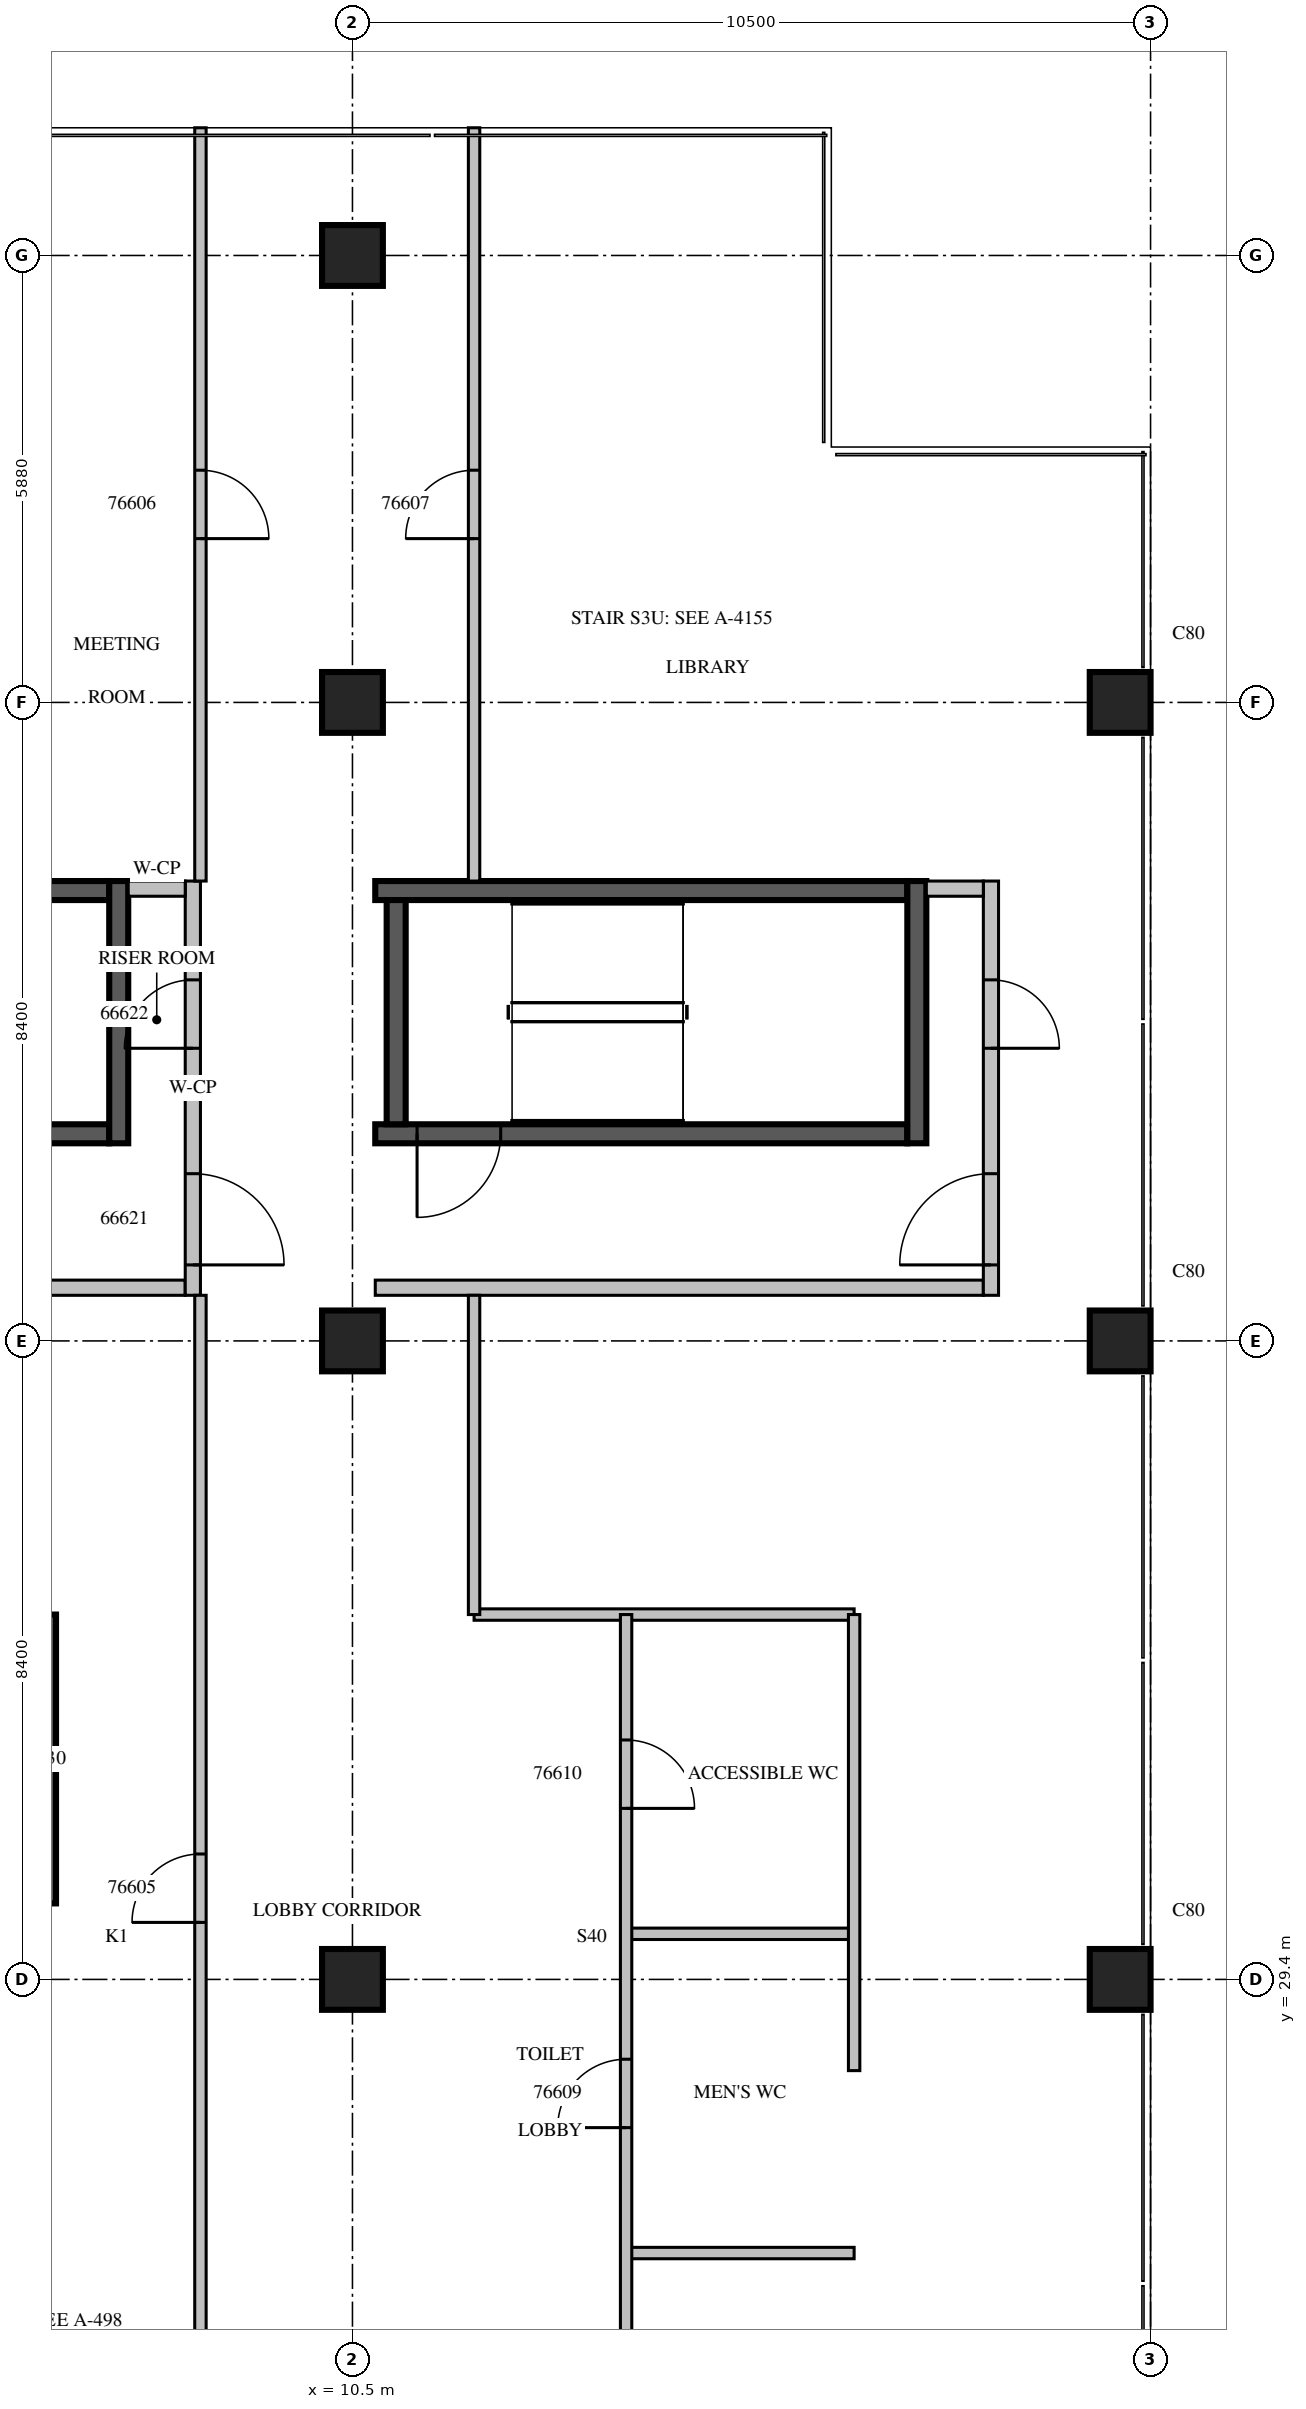
"""IFC4 building model, lengths in metres.
Left out: names, types, materials, properties, quantities, classifications, styles, units other than length and angle.
Written with IfcOpenShell. Run it as: python <this file> out.ifc"""

import sys

from ifc_helpers import new_model, si_unit, direction, frame, frame_2d, origin, origin_2d, place, context, subcontext, project, spatial, rectangle, extrude, source, transform, mapped, element, fill, save


model = new_model("IFC4")
c1 = context("Model", 3, precision=1e-05, world=origin(), true_north=direction((0.0, 1.0)))
c2 = subcontext(c1, "Body", "Model", "MODEL_VIEW")
j1 = project(units=[si_unit("LENGTHUNIT", "METRE"), si_unit("PLANEANGLEUNIT", "RADIAN")], contexts=[c1])
p1 = place(None, origin())
s1 = spatial("IfcSite", under=j1, at=p1, CompositionType="ELEMENT")
p2 = place(p1, origin())
s2 = spatial("IfcBuilding", under=s1, at=p2, CompositionType="ELEMENT")
p3 = place(p2, frame((0.0, 0.0, 277.0)))
s3 = spatial("IfcBuildingStorey", under=s2, at=p3, CompositionType="ELEMENT", Elevation=277.0)
m1 = source(origin(), c2, "Body", "SweptSolid", [
    extrude(rectangle(XDim=0.8, YDim=0.8, at=origin_2d()), origin(), (0.0, 0.0, 1.0), 7.5),
])
for number, where, z_axis, x_axis in (
    (1, (10.5, 29.4, 0.0), (0.0, 0.0, 1.0), (1.0, 0.0, 0.0)),
    (2, (20.6, 29.4, 0.0), (0.0, 0.0, 1.0), (1.0, 0.0, 0.0)),
    (3, (10.5, 37.8, 0.0), (0.0, 0.0, 1.0), (1.0, 0.0, 0.0)),
    (4, (20.6, 37.8, 0.0), (0.0, 0.0, 1.0), (1.0, 0.0, 0.0)),
    (5, (10.5, 46.2, 0.0), (0.0, 0.0, 1.0), (1.0, 0.0, 0.0)),
    (6, (20.6, 46.2, 0.0), (0.0, 0.0, 1.0), (1.0, 0.0, 0.0)),
    (7, (10.5, 52.08, 0.0), (0.0, 0.0, 1.0), (1.0, 0.0, 0.0)),
):
    element("IfcColumn", number, at=place(p3, frame(where, z_axis=z_axis, x_axis=x_axis)), inside=s3, PredefinedType="COLUMN", context=c2, shape_type="MappedRepresentation", body=[
        mapped(m1, transform((0.0, 0.0, 0.0), scale=1.0)),
    ])
m2 = source(origin(), c2, "Body", "SweptSolid", [
    extrude(rectangle(XDim=3.8, YDim=0.3, at=frame_2d((1.9, 0.0))), origin(), (0.0, 0.0, 1.0), 7.1),
])
p4 = place(p3, frame((6.45, 34.2, 0.0), z_axis=(0.0, 0.0, 1.0), x_axis=(0.0, -1.0, 0.0)))
e8 = element("IfcWall", 8, at=p4, inside=s3, PredefinedType="SOLIDWALL", context=c2, shape_type="MappedRepresentation", body=[
    mapped(m2, transform((0.0, 0.0, 0.0), scale=1.0)),
])
m3 = source(origin(), c2, "Body", "SweptSolid", [
    extrude(rectangle(XDim=7.0, YDim=0.25, at=frame_2d((3.5, 0.0))), origin(), (0.0, 0.0, 1.0), 7.1),
])
p5 = place(p3, frame((0.3, 40.525, 0.0), z_axis=(0.0, 0.0, 1.0), x_axis=(1.0, 0.0, 0.0)))
e9 = element("IfcWall", 9, at=p5, inside=s3, PredefinedType="SOLIDWALL", context=c2, shape_type="MappedRepresentation", body=[
    mapped(m3, transform((0.0, 0.0, 0.0), scale=1.0)),
])
m4 = source(origin(), c2, "Body", "SweptSolid", [
    extrude(rectangle(XDim=1.1, YDim=2.1, at=frame_2d((0.55, 1.05))), frame((0.0, 0.135, 0.0), z_axis=(0.0, -1.0, 0.0), x_axis=(1.0, 0.0, 0.0)), (0.0, 0.0, 1.0), 0.27),
])
p6 = place(p5, frame((0.55, 0.0, 0.0)))
e10 = element("IfcOpeningElement", 10, at=p6, cuts=e9, PredefinedType="OPENING", context=c2, shape_type="MappedRepresentation", body=[
    mapped(m4, transform((0.0, 0.0, 0.0), scale=1.0)),
])
m5 = source(origin(), c2, "Body", "SweptSolid", [
    extrude(rectangle(XDim=1.0, YDim=0.25, at=frame_2d((0.5, 0.0))), origin(), (0.0, 0.0, 1.0), 7.1),
])
p7 = place(p3, frame((6.3, 43.725, 0.0), z_axis=(0.0, 0.0, 1.0), x_axis=(1.0, 0.0, 0.0)))
e11 = element("IfcWall", 11, at=p7, inside=s3, PredefinedType="SOLIDWALL", context=c2, shape_type="MappedRepresentation", body=[
    mapped(m5, transform((0.0, 0.0, 0.0), scale=1.0)),
])
m6 = source(origin(), c2, "Body", "SweptSolid", [
    extrude(rectangle(XDim=3.45, YDim=0.25, at=frame_2d((1.725, 0.0))), origin(), (0.0, 0.0, 1.0), 7.1),
])
p8 = place(p3, frame((7.425, 40.4, 0.0), z_axis=(0.0, 0.0, 1.0), x_axis=(0.0, 1.0, 0.0)))
e12 = element("IfcWall", 12, at=p8, inside=s3, PredefinedType="SOLIDWALL", context=c2, shape_type="MappedRepresentation", body=[
    mapped(m6, transform((0.0, 0.0, 0.0), scale=1.0)),
])
m7 = source(origin(), c2, "Body", "SweptSolid", [
    extrude(rectangle(XDim=8.0, YDim=0.2, at=frame_2d((4.0, 0.0))), origin(), (0.0, 0.0, 1.0), 7.1),
])
p9 = place(p3, frame((0.3, 38.5, 0.0), z_axis=(0.0, 0.0, 1.0), x_axis=(1.0, 0.0, 0.0)))
e13 = element("IfcWall", 13, at=p9, inside=s3, PredefinedType="PARTITIONING", context=c2, shape_type="MappedRepresentation", body=[
    mapped(m7, transform((0.0, 0.0, 0.0), scale=1.0)),
])
m8 = source(origin(), c2, "Body", "SweptSolid", [
    extrude(rectangle(XDim=5.45, YDim=0.2, at=frame_2d((2.725, 0.0))), origin(), (0.0, 0.0, 1.0), 7.1),
])
p10 = place(p3, frame((8.4, 38.4, 0.0), z_axis=(0.0, 0.0, 1.0), x_axis=(0.0, 1.0, 0.0)))
e14 = element("IfcWall", 14, at=p10, inside=s3, PredefinedType="PARTITIONING", context=c2, shape_type="MappedRepresentation", body=[
    mapped(m8, transform((0.0, 0.0, 0.0), scale=1.0)),
])
m9 = source(origin(), c2, "Body", "SweptSolid", [
    extrude(rectangle(XDim=1.2, YDim=2.1, at=frame_2d((0.6, 1.05))), frame((0.0, 0.11, 0.0), z_axis=(0.0, -1.0, 0.0), x_axis=(1.0, 0.0, 0.0)), (0.0, 0.0, 1.0), 0.22),
])
p11 = place(p10, frame((0.4, 0.0, 0.0)))
e15 = element("IfcOpeningElement", 15, at=p11, cuts=e14, PredefinedType="OPENING", context=c2, shape_type="MappedRepresentation", body=[
    mapped(m9, transform((0.0, 0.0, 0.0), scale=1.0)),
])
m10 = source(origin(), c2, "Body", "SweptSolid", [
    extrude(rectangle(XDim=0.9, YDim=2.1, at=frame_2d((0.45, 1.05))), frame((0.0, 0.11, 0.0), z_axis=(0.0, -1.0, 0.0), x_axis=(1.0, 0.0, 0.0)), (0.0, 0.0, 1.0), 0.22),
])
p12 = place(p10, frame((3.25, 0.0, 0.0)))
e16 = element("IfcOpeningElement", 16, at=p12, cuts=e14, PredefinedType="OPENING", context=c2, shape_type="MappedRepresentation", body=[
    mapped(m10, transform((0.0, 0.0, 0.0), scale=1.0)),
])
m11 = source(origin(), c2, "Body", "SweptSolid", [
    extrude(rectangle(XDim=0.75, YDim=0.2, at=frame_2d((0.375, 0.0))), origin(), (0.0, 0.0, 1.0), 7.1),
])
p13 = place(p3, frame((7.55, 43.75, 0.0), z_axis=(0.0, 0.0, 1.0), x_axis=(1.0, 0.0, 0.0)))
e17 = element("IfcWall", 17, at=p13, inside=s3, PredefinedType="PARTITIONING", context=c2, shape_type="MappedRepresentation", body=[
    mapped(m11, transform((0.0, 0.0, 0.0), scale=1.0)),
])
p14 = place(p3, frame((10.8, 40.525, 0.0), z_axis=(0.0, 0.0, 1.0), x_axis=(1.0, 0.0, 0.0)))
e18 = element("IfcWall", 18, at=p14, inside=s3, PredefinedType="SOLIDWALL", context=c2, shape_type="MappedRepresentation", body=[
    mapped(m3, transform((0.0, 0.0, 0.0), scale=1.0)),
])
p15 = place(p14, frame((0.55, 0.0, 0.0)))
e19 = element("IfcOpeningElement", 19, at=p15, cuts=e18, PredefinedType="OPENING", context=c2, shape_type="MappedRepresentation", body=[
    mapped(m4, transform((0.0, 0.0, 0.0), scale=1.0)),
])
p16 = place(p3, frame((10.8, 43.725, 0.0), z_axis=(0.0, 0.0, 1.0), x_axis=(1.0, 0.0, 0.0)))
e20 = element("IfcWall", 20, at=p16, inside=s3, PredefinedType="SOLIDWALL", context=c2, shape_type="MappedRepresentation", body=[
    mapped(m3, transform((0.0, 0.0, 0.0), scale=1.0)),
])
p17 = place(p3, frame((17.925, 40.4, 0.0), z_axis=(0.0, 0.0, 1.0), x_axis=(0.0, 1.0, 0.0)))
e21 = element("IfcWall", 21, at=p17, inside=s3, PredefinedType="SOLIDWALL", context=c2, shape_type="MappedRepresentation", body=[
    mapped(m6, transform((0.0, 0.0, 0.0), scale=1.0)),
])
m12 = source(origin(), c2, "Body", "SweptSolid", [
    extrude(rectangle(XDim=2.95, YDim=0.25, at=frame_2d((1.475, 0.0))), origin(), (0.0, 0.0, 1.0), 7.1),
])
p18 = place(p3, frame((11.075, 40.65, 0.0), z_axis=(0.0, 0.0, 1.0), x_axis=(0.0, 1.0, 0.0)))
e22 = element("IfcWall", 22, at=p18, inside=s3, PredefinedType="SOLIDWALL", context=c2, shape_type="MappedRepresentation", body=[
    mapped(m12, transform((0.0, 0.0, 0.0), scale=1.0)),
])
p19 = place(p3, frame((10.8, 38.5, 0.0), z_axis=(0.0, 0.0, 1.0), x_axis=(1.0, 0.0, 0.0)))
e23 = element("IfcWall", 23, at=p19, inside=s3, PredefinedType="PARTITIONING", context=c2, shape_type="MappedRepresentation", body=[
    mapped(m7, transform((0.0, 0.0, 0.0), scale=1.0)),
])
p20 = place(p3, frame((18.9, 38.4, 0.0), z_axis=(0.0, 0.0, 1.0), x_axis=(0.0, 1.0, 0.0)))
e24 = element("IfcWall", 24, at=p20, inside=s3, PredefinedType="PARTITIONING", context=c2, shape_type="MappedRepresentation", body=[
    mapped(m8, transform((0.0, 0.0, 0.0), scale=1.0)),
])
p21 = place(p20, frame((0.4, 0.0, 0.0)))
e25 = element("IfcOpeningElement", 25, at=p21, cuts=e24, PredefinedType="OPENING", context=c2, shape_type="MappedRepresentation", body=[
    mapped(m9, transform((0.0, 0.0, 0.0), scale=1.0)),
])
p22 = place(p20, frame((3.25, 0.0, 0.0)))
e26 = element("IfcOpeningElement", 26, at=p22, cuts=e24, PredefinedType="OPENING", context=c2, shape_type="MappedRepresentation", body=[
    mapped(m10, transform((0.0, 0.0, 0.0), scale=1.0)),
])
p23 = place(p3, frame((18.05, 43.75, 0.0), z_axis=(0.0, 0.0, 1.0), x_axis=(1.0, 0.0, 0.0)))
e27 = element("IfcWall", 27, at=p23, inside=s3, PredefinedType="PARTITIONING", context=c2, shape_type="MappedRepresentation", body=[
    mapped(m11, transform((0.0, 0.0, 0.0), scale=1.0)),
])
m13 = source(origin(), c2, "Body", "SweptSolid", [
    extrude(rectangle(XDim=3.0, YDim=0.15, at=frame_2d((1.5, 0.0))), origin(), (0.0, 0.0, 1.0), 7.1),
])
for number, where, z_axis, x_axis in (
    (28, (14.1, 25.8, 0.0), (0.0, 0.0, 1.0), (1.0, 0.0, 0.0)),
    (29, (14.1, 30.0, 0.0), (0.0, 0.0, 1.0), (1.0, 0.0, 0.0)),
):
    element("IfcWall", number, at=place(p3, frame(where, z_axis=z_axis, x_axis=x_axis)), inside=s3, PredefinedType="PARTITIONING", context=c2, shape_type="MappedRepresentation", body=[
        mapped(m13, transform((0.0, 0.0, 0.0), scale=1.0)),
    ])
m14 = source(origin(), c2, "Body", "SweptSolid", [
    extrude(rectangle(XDim=5.0, YDim=0.15, at=frame_2d((2.5, 0.0))), origin(), (0.0, 0.0, 1.0), 7.1),
])
p24 = place(p3, frame((12.1, 34.2, 0.0), z_axis=(0.0, 0.0, 1.0), x_axis=(1.0, 0.0, 0.0)))
e30 = element("IfcWall", 30, at=p24, inside=s3, PredefinedType="PARTITIONING", context=c2, shape_type="MappedRepresentation", body=[
    mapped(m14, transform((0.0, 0.0, 0.0), scale=1.0)),
])
m15 = source(origin(), c2, "Body", "SweptSolid", [
    extrude(rectangle(XDim=16.2, YDim=0.15, at=frame_2d((8.1, 0.0))), origin(), (0.0, 0.0, 1.0), 7.1),
])
p25 = place(p3, frame((8.5, 22.2, 0.0), z_axis=(0.0, 0.0, 1.0), x_axis=(0.0, 1.0, 0.0)))
e31 = element("IfcWall", 31, at=p25, inside=s3, PredefinedType="PARTITIONING", context=c2, shape_type="MappedRepresentation", body=[
    mapped(m15, transform((0.0, 0.0, 0.0), scale=1.0)),
])
m16 = source(origin(), c2, "Body", "SweptSolid", [
    extrude(rectangle(XDim=0.9, YDim=2.1, at=frame_2d((0.45, 1.05))), frame((0.0, 0.085, 0.0), z_axis=(0.0, -1.0, 0.0), x_axis=(1.0, 0.0, 0.0)), (0.0, 0.0, 1.0), 0.17),
])
p26 = place(p25, frame((7.95, 0.0, 0.0)))
e32 = element("IfcOpeningElement", 32, at=p26, cuts=e31, PredefinedType="OPENING", context=c2, shape_type="MappedRepresentation", body=[
    mapped(m16, transform((0.0, 0.0, 0.0), scale=1.0)),
])
m17 = source(origin(), c2, "Body", "SweptSolid", [
    extrude(rectangle(XDim=9.91, YDim=0.15, at=frame_2d((4.955, 0.0))), origin(), (0.0, 0.0, 1.0), 7.1),
])
p27 = place(p3, frame((8.5, 43.85, 0.0), z_axis=(0.0, 0.0, 1.0), x_axis=(0.0, 1.0, 0.0)))
e33 = element("IfcWall", 33, at=p27, inside=s3, PredefinedType="PARTITIONING", context=c2, shape_type="MappedRepresentation", body=[
    mapped(m17, transform((0.0, 0.0, 0.0), scale=1.0)),
])
p28 = place(p27, frame((4.505, 0.0, 0.0)))
e34 = element("IfcOpeningElement", 34, at=p28, cuts=e33, PredefinedType="OPENING", context=c2, shape_type="MappedRepresentation", body=[
    mapped(m16, transform((0.0, 0.0, 0.0), scale=1.0)),
])
p29 = place(p3, frame((12.1, 34.2, 0.0), z_axis=(0.0, 0.0, 1.0), x_axis=(0.0, 1.0, 0.0)))
e35 = element("IfcWall", 35, at=p29, inside=s3, PredefinedType="PARTITIONING", context=c2, shape_type="SweptSolid", body=[
    extrude(rectangle(XDim=4.2, YDim=0.15, at=frame_2d((2.1, 0.0))), origin(), (0.0, 0.0, 1.0), 7.1),
])
p30 = place(p3, frame((12.1, 43.85, 0.0), z_axis=(0.0, 0.0, 1.0), x_axis=(0.0, 1.0, 0.0)))
e36 = element("IfcWall", 36, at=p30, inside=s3, PredefinedType="PARTITIONING", context=c2, shape_type="MappedRepresentation", body=[
    mapped(m17, transform((0.0, 0.0, 0.0), scale=1.0)),
])
p31 = place(p30, frame((4.505, 0.0, 0.0)))
e37 = element("IfcOpeningElement", 37, at=p31, cuts=e36, PredefinedType="OPENING", context=c2, shape_type="MappedRepresentation", body=[
    mapped(m16, transform((0.0, 0.0, 0.0), scale=1.0)),
])
m18 = source(origin(), c2, "Body", "SweptSolid", [
    extrude(rectangle(XDim=12.6, YDim=0.15, at=frame_2d((6.3, 0.0))), origin(), (0.0, 0.0, 1.0), 7.1),
])
p32 = place(p3, frame((14.1, 21.6, 0.0), z_axis=(0.0, 0.0, 1.0), x_axis=(0.0, 1.0, 0.0)))
e38 = element("IfcWall", 38, at=p32, inside=s3, PredefinedType="PARTITIONING", context=c2, shape_type="MappedRepresentation", body=[
    mapped(m18, transform((0.0, 0.0, 0.0), scale=1.0)),
])
p33 = place(p32, frame((1.65, 0.0, 0.0)))
e39 = element("IfcOpeningElement", 39, at=p33, cuts=e38, PredefinedType="OPENING", context=c2, shape_type="MappedRepresentation", body=[
    mapped(m16, transform((0.0, 0.0, 0.0), scale=1.0)),
])
p34 = place(p32, frame((5.85, 0.0, 0.0)))
e40 = element("IfcOpeningElement", 40, at=p34, cuts=e38, PredefinedType="OPENING", context=c2, shape_type="MappedRepresentation", body=[
    mapped(m16, transform((0.0, 0.0, 0.0), scale=1.0)),
])
p35 = place(p32, frame((10.05, 0.0, 0.0)))
e41 = element("IfcOpeningElement", 41, at=p35, cuts=e38, PredefinedType="OPENING", context=c2, shape_type="MappedRepresentation", body=[
    mapped(m16, transform((0.0, 0.0, 0.0), scale=1.0)),
])
m19 = source(origin(), c2, "Body", "SweptSolid", [
    extrude(rectangle(XDim=6.0, YDim=0.15, at=frame_2d((3.0, 0.0))), origin(), (0.0, 0.0, 1.0), 7.1),
])
p36 = place(p3, frame((17.1, 28.2, 0.0), z_axis=(0.0, 0.0, 1.0), x_axis=(0.0, 1.0, 0.0)))
e42 = element("IfcWall", 42, at=p36, inside=s3, PredefinedType="PARTITIONING", context=c2, shape_type="MappedRepresentation", body=[
    mapped(m19, transform((0.0, 0.0, 0.0), scale=1.0)),
])
m20 = source(origin(), c2, "Body", "SweptSolid", [
    extrude(rectangle(XDim=1.2, YDim=2.1, at=frame_2d((0.6, 1.05))), frame((0.0, 0.025, 0.0), z_axis=(0.0, -1.0, 0.0), x_axis=(1.0, 0.0, 0.0)), (0.0, 0.0, 1.0), 0.05),
])
p37 = place(p11, origin())
e43 = element("IfcDoor", 43, at=p37, inside=s3, OperationType="SINGLE_SWING_RIGHT", PredefinedType="DOOR", context=c2, shape_type="MappedRepresentation", body=[
    mapped(m20, transform((0.0, 0.0, 0.0), scale=1.0)),
])
fill(e15, e43)
m21 = source(origin(), c2, "Body", "SweptSolid", [
    extrude(rectangle(XDim=0.9, YDim=2.1, at=frame_2d((0.45, 1.05))), frame((0.0, 0.025, 0.0), z_axis=(0.0, -1.0, 0.0), x_axis=(1.0, 0.0, 0.0)), (0.0, 0.0, 1.0), 0.05),
])
p38 = place(p12, origin())
e44 = element("IfcDoor", 44, at=p38, inside=s3, OperationType="SINGLE_SWING_LEFT", PredefinedType="DOOR", context=c2, shape_type="MappedRepresentation", body=[
    mapped(m21, transform((0.0, 0.0, 0.0), scale=1.0)),
])
fill(e16, e44)
m22 = source(origin(), c2, "Body", "SweptSolid", [
    extrude(rectangle(XDim=1.1, YDim=2.1, at=frame_2d((0.55, 1.05))), frame((0.0, 0.025, 0.0), z_axis=(0.0, -1.0, 0.0), x_axis=(1.0, 0.0, 0.0)), (0.0, 0.0, 1.0), 0.05),
])
p39 = place(p15, origin())
e45 = element("IfcDoor", 45, at=p39, inside=s3, OperationType="SINGLE_SWING_RIGHT", PredefinedType="DOOR", context=c2, shape_type="MappedRepresentation", body=[
    mapped(m22, transform((0.0, 0.0, 0.0), scale=1.0)),
])
fill(e19, e45)
p40 = place(p21, origin())
e46 = element("IfcDoor", 46, at=p40, inside=s3, OperationType="SINGLE_SWING_LEFT", PredefinedType="DOOR", context=c2, shape_type="MappedRepresentation", body=[
    mapped(m20, transform((0.0, 0.0, 0.0), scale=1.0)),
])
fill(e25, e46)
p41 = place(p22, origin())
e47 = element("IfcDoor", 47, at=p41, inside=s3, OperationType="SINGLE_SWING_RIGHT", PredefinedType="DOOR", context=c2, shape_type="MappedRepresentation", body=[
    mapped(m21, transform((0.0, 0.0, 0.0), scale=1.0)),
])
fill(e26, e47)
p42 = place(p26, origin())
e48 = element("IfcDoor", 48, at=p42, inside=s3, OperationType="SINGLE_SWING_LEFT", PredefinedType="DOOR", context=c2, shape_type="MappedRepresentation", body=[
    mapped(m21, transform((0.0, 0.0, 0.0), scale=1.0)),
])
fill(e32, e48)
p43 = place(p28, origin())
e49 = element("IfcDoor", 49, at=p43, inside=s3, OperationType="SINGLE_SWING_RIGHT", PredefinedType="DOOR", context=c2, shape_type="MappedRepresentation", body=[
    mapped(m21, transform((0.0, 0.0, 0.0), scale=1.0)),
])
fill(e34, e49)
p44 = place(p31, origin())
e50 = element("IfcDoor", 50, at=p44, inside=s3, OperationType="SINGLE_SWING_LEFT", PredefinedType="DOOR", context=c2, shape_type="MappedRepresentation", body=[
    mapped(m21, transform((0.0, 0.0, 0.0), scale=1.0)),
])
fill(e37, e50)
p45 = place(p34, origin())
e51 = element("IfcDoor", 51, at=p45, inside=s3, OperationType="SINGLE_SWING_LEFT", PredefinedType="DOOR", context=c2, shape_type="MappedRepresentation", body=[
    mapped(m21, transform((0.0, 0.0, 0.0), scale=1.0)),
])
fill(e40, e51)
p46 = place(p35, origin())
e52 = element("IfcDoor", 52, at=p46, inside=s3, OperationType="SINGLE_SWING_RIGHT", PredefinedType="DOOR", context=c2, shape_type="MappedRepresentation", body=[
    mapped(m21, transform((0.0, 0.0, 0.0), scale=1.0)),
])
fill(e41, e52)
save(model, sys.argv[1])
